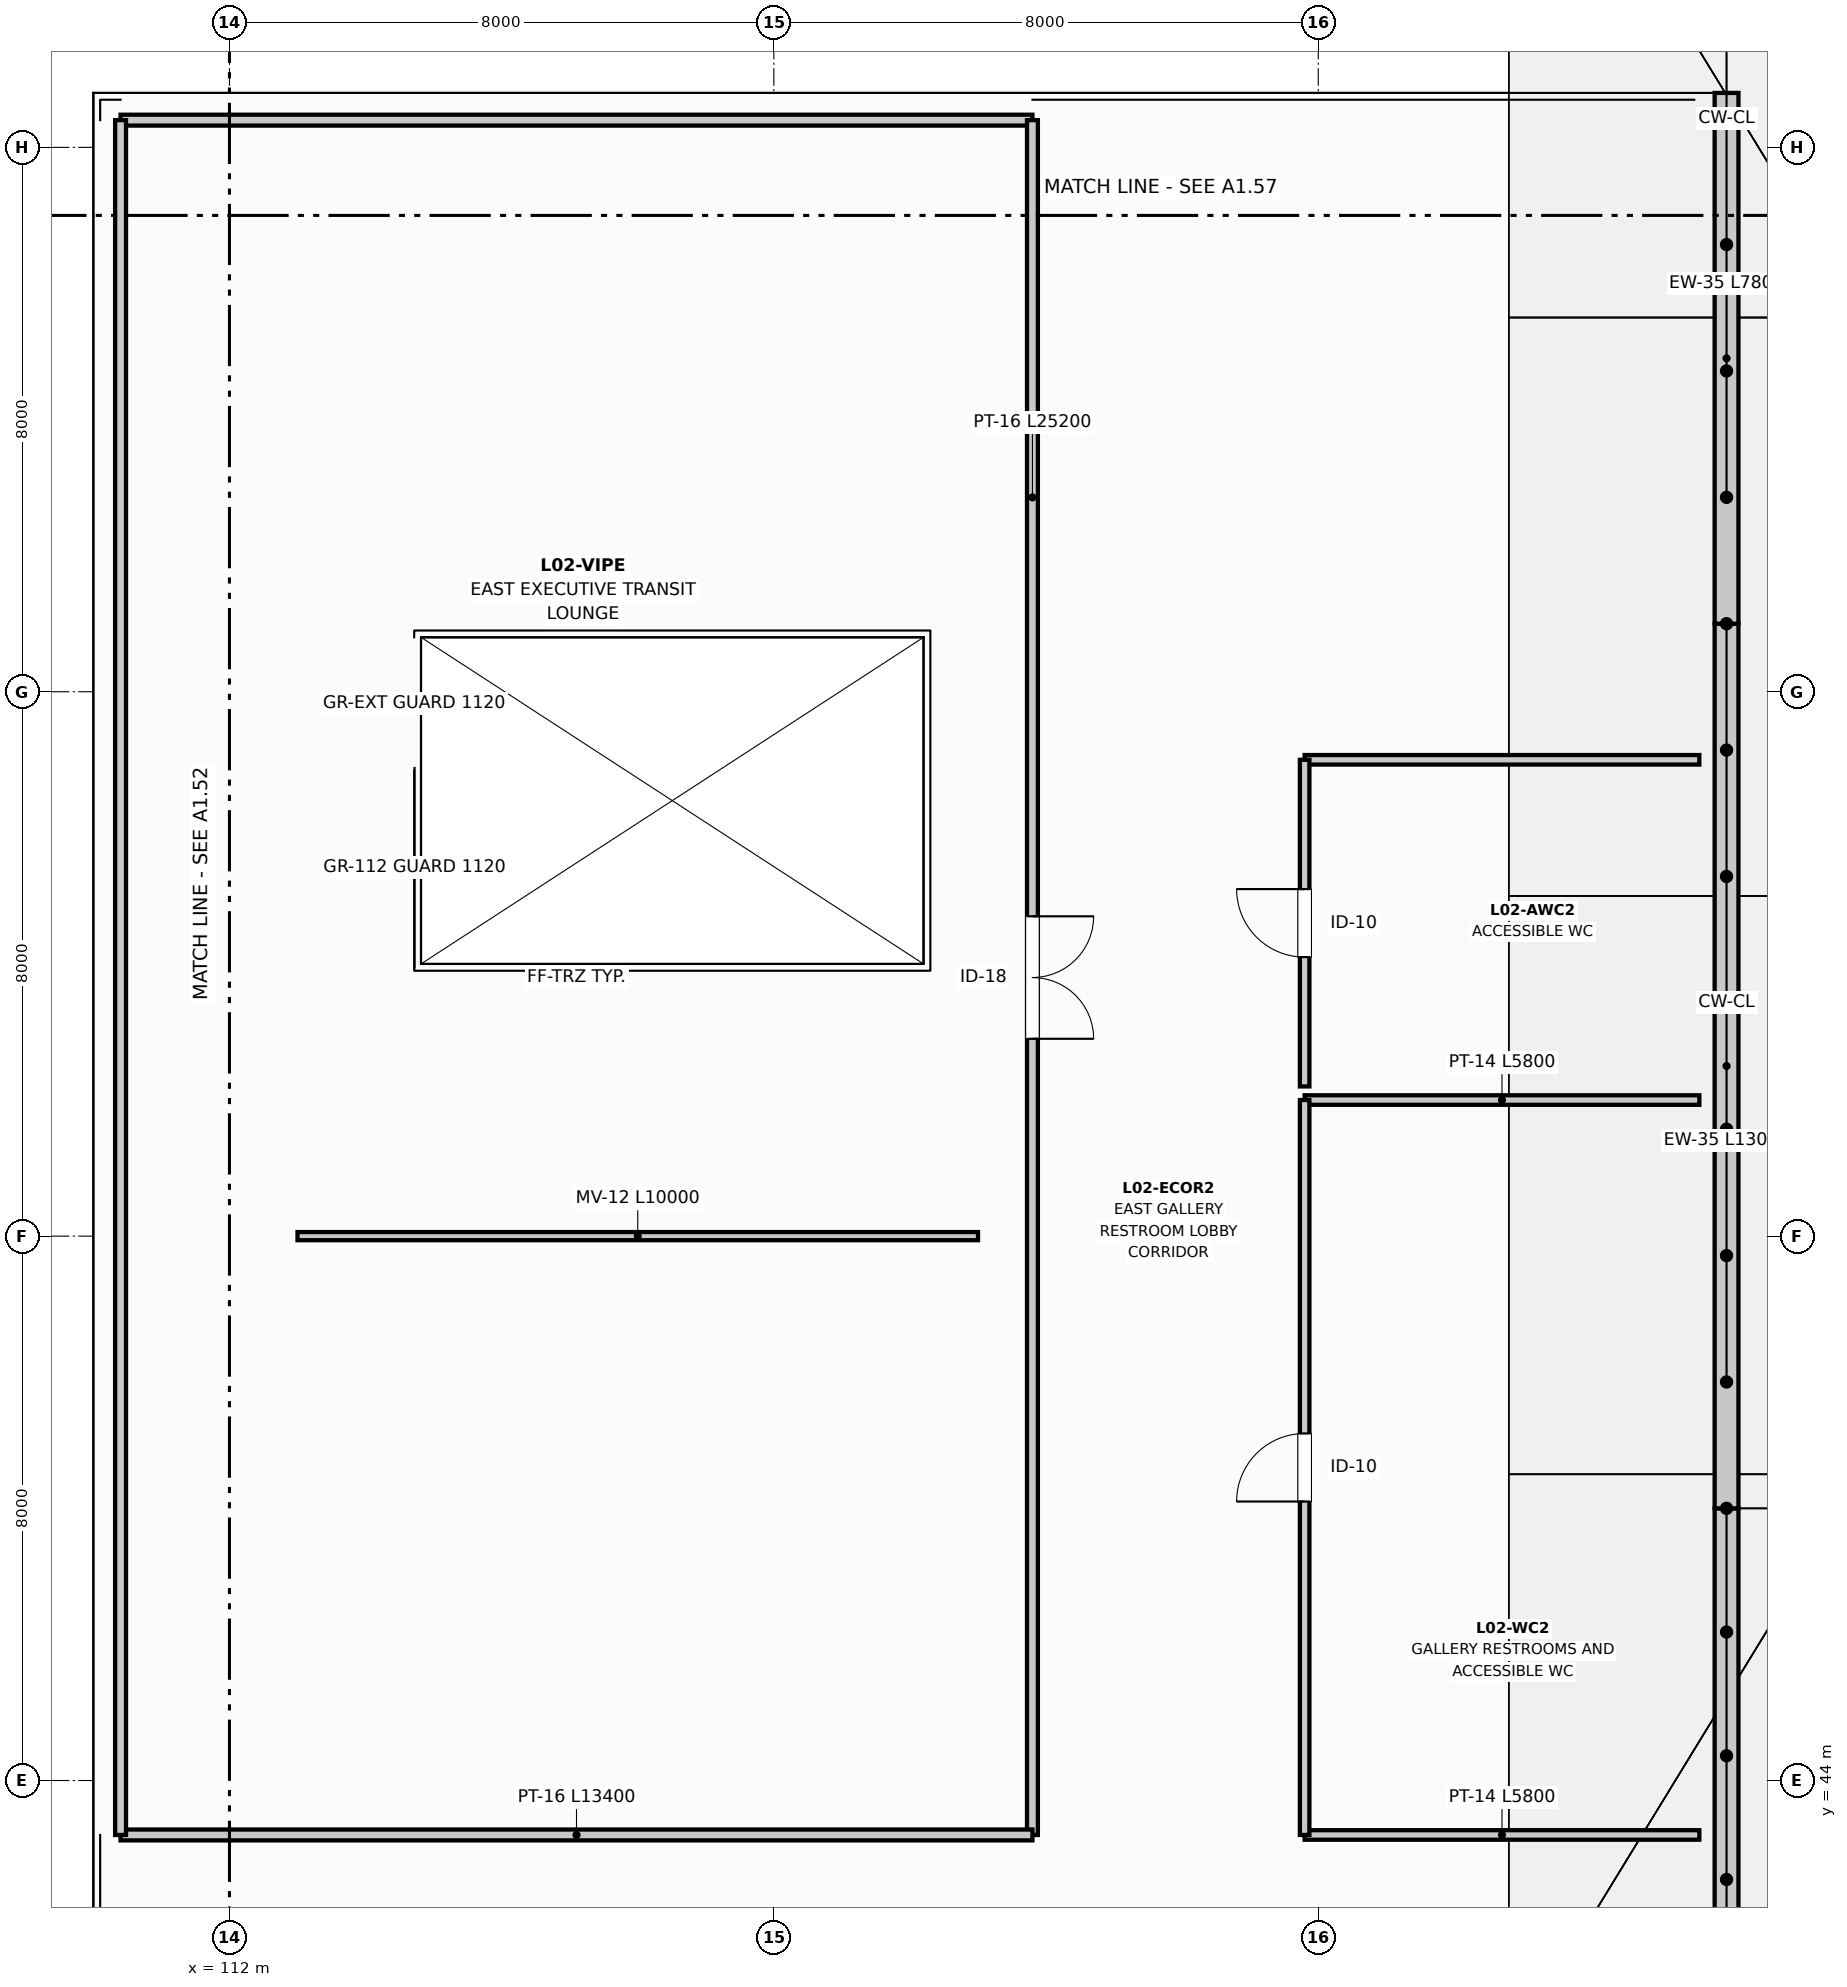
"""IFC4 building model, lengths in metres.
Left out: names, types, materials, properties, quantities, classifications, styles, units other than length and angle.
Written with IfcOpenShell. Run it as: python <this file> out.ifc"""

import sys

from ifc_helpers import new_model, si_unit, direction, frame, frame_2d, origin, place, context, subcontext, project, spatial, rectangle, extrude, element, fill, save


model = new_model("IFC4")
c1 = context("Model", 3, precision=1e-05, world=origin(), true_north=direction((0.0, 1.0)))
c2 = subcontext(c1, "Body", "Model", "MODEL_VIEW")
j1 = project(units=[si_unit("LENGTHUNIT", "METRE"), si_unit("PLANEANGLEUNIT", "RADIAN")], contexts=[c1])
p1 = place(None, origin())
s1 = spatial("IfcSite", under=j1, at=p1, CompositionType="ELEMENT")
p2 = place(p1, origin())
s2 = spatial("IfcBuilding", under=s1, at=p2, CompositionType="ELEMENT")
p3 = place(p2, frame((0.0, 0.0, 11.4)))
s3 = spatial("IfcBuildingStorey", under=s2, at=p3, CompositionType="ELEMENT", Elevation=11.4)
p4 = place(p3, frame((134.0, 28.0, 0.0), z_axis=(0.0, 0.0, 1.0), x_axis=(0.0, 1.0, 0.0)))
e1 = element("IfcWall", 1, at=p4, inside=s3, PredefinedType="STANDARD", context=c2, shape_type="SweptSolid", body=[
    extrude(rectangle(XDim=20.0, YDim=0.35, at=frame_2d((10.0, 0.0))), origin(), (0.0, 0.0, 1.0), 1.162),
])
p5 = place(p3, frame((134.0, 48.0, 0.0), z_axis=(0.0, 0.0, 1.0), x_axis=(0.0, 1.0, 0.0)))
e2 = element("IfcWall", 2, at=p5, inside=s3, PredefinedType="STANDARD", context=c2, shape_type="SweptSolid", body=[
    extrude(rectangle(XDim=13.0, YDim=0.35, at=frame_2d((6.5, 0.0))), origin(), (0.0, 0.0, 1.0), 0.95),
])
p6 = place(p3, frame((134.0, 61.0, 0.0), z_axis=(0.0, 0.0, 1.0), x_axis=(0.0, 1.0, 0.0)))
e3 = element("IfcWall", 3, at=p6, inside=s3, PredefinedType="STANDARD", context=c2, shape_type="SweptSolid", body=[
    extrude(rectangle(XDim=7.8, YDim=0.35, at=frame_2d((3.9, 0.0))), origin(), (0.0, 0.0, 1.0), 0.95),
])
p7 = place(p3, frame((110.4, 68.4, 0.0), z_axis=(0.0, 0.0, 1.0), x_axis=(1.0, 0.0, 0.0)))
e4 = element("IfcWall", 4, at=p7, inside=s3, PredefinedType="PARTITIONING", context=c2, shape_type="SweptSolid", body=[
    extrude(rectangle(XDim=13.4, YDim=0.16, at=frame_2d((6.7, 0.0))), origin(), (0.0, 0.0, 1.0), 4.46),
])
p8 = place(p3, frame((123.8, 68.4, 0.0), z_axis=(0.0, 0.0, 1.0), x_axis=(0.0, -1.0, 0.0)))
e5 = element("IfcWall", 5, at=p8, inside=s3, PredefinedType="PARTITIONING", context=c2, shape_type="SweptSolid", body=[
    extrude(rectangle(XDim=25.2, YDim=0.16, at=frame_2d((12.6, 0.0))), origin(), (0.0, 0.0, 1.0), 4.46),
])
p9 = place(p8, frame((11.7, 0.0, 0.0)))
e6 = element("IfcOpeningElement", 6, at=p9, cuts=e5, PredefinedType="OPENING", context=c2, shape_type="SweptSolid", body=[
    extrude(rectangle(XDim=1.8, YDim=2.25, at=frame_2d((0.9, 1.125))), frame((0.0, 0.09, 0.0), z_axis=(0.0, -1.0, 0.0), x_axis=(1.0, 0.0, 0.0)), (0.0, 0.0, 1.0), 0.18),
])
p10 = place(p3, frame((123.8, 43.2, 0.0), z_axis=(0.0, 0.0, 1.0), x_axis=(-1.0, 0.0, 0.0)))
e7 = element("IfcWall", 7, at=p10, inside=s3, PredefinedType="PARTITIONING", context=c2, shape_type="SweptSolid", body=[
    extrude(rectangle(XDim=13.4, YDim=0.16, at=frame_2d((6.7, 0.0))), origin(), (0.0, 0.0, 1.0), 4.46),
])
p11 = place(p3, frame((110.4, 43.2, 0.0), z_axis=(0.0, 0.0, 1.0), x_axis=(0.0, 1.0, 0.0)))
e8 = element("IfcWall", 8, at=p11, inside=s3, PredefinedType="PARTITIONING", context=c2, shape_type="SweptSolid", body=[
    extrude(rectangle(XDim=25.2, YDim=0.16, at=frame_2d((12.6, 0.0))), origin(), (0.0, 0.0, 1.0), 4.46),
])
for number, where, z_axis, x_axis in (
    (9, (127.8, 54.0, 0.0), (0.0, 0.0, 1.0), (1.0, 0.0, 0.0)),
    (10, (133.6, 43.2, 0.0), (0.0, 0.0, 1.0), (-1.0, 0.0, 0.0)),
):
    element("IfcWall", number, at=place(p3, frame(where, z_axis=z_axis, x_axis=x_axis)), inside=s3, PredefinedType="PARTITIONING", context=c2, shape_type="SweptSolid", body=[
        extrude(rectangle(XDim=5.8, YDim=0.14, at=frame_2d((2.9, 0.0))), origin(), (0.0, 0.0, 1.0), 4.46),
    ])
p12 = place(p3, frame((127.8, 43.2, 0.0), z_axis=(0.0, 0.0, 1.0), x_axis=(0.0, 1.0, 0.0)))
e11 = element("IfcWall", 11, at=p12, inside=s3, PredefinedType="PARTITIONING", context=c2, shape_type="SweptSolid", body=[
    extrude(rectangle(XDim=10.8, YDim=0.14, at=frame_2d((5.4, 0.0))), origin(), (0.0, 0.0, 1.0), 4.46),
])
p13 = place(p12, frame((4.9, 0.0, 0.0)))
e12 = element("IfcOpeningElement", 12, at=p13, cuts=e11, PredefinedType="OPENING", context=c2, shape_type="SweptSolid", body=[
    extrude(rectangle(XDim=1.0, YDim=2.15, at=frame_2d((0.5, 1.075))), frame((0.0, 0.08, 0.0), z_axis=(0.0, -1.0, 0.0), x_axis=(1.0, 0.0, 0.0)), (0.0, 0.0, 1.0), 0.16),
])
p14 = place(p3, frame((127.8, 59.0, 0.0), z_axis=(0.0, 0.0, 1.0), x_axis=(1.0, 0.0, 0.0)))
e13 = element("IfcWall", 13, at=p14, inside=s3, PredefinedType="PARTITIONING", context=c2, shape_type="SweptSolid", body=[
    extrude(rectangle(XDim=5.8, YDim=0.14, at=frame_2d((2.9, 0.0))), origin(), (0.0, 0.0, 1.0), 4.46),
])
p15 = place(p3, frame((127.8, 54.2, 0.0), z_axis=(0.0, 0.0, 1.0), x_axis=(0.0, 1.0, 0.0)))
e14 = element("IfcWall", 14, at=p15, inside=s3, PredefinedType="PARTITIONING", context=c2, shape_type="SweptSolid", body=[
    extrude(rectangle(XDim=4.8, YDim=0.14, at=frame_2d((2.4, 0.0))), origin(), (0.0, 0.0, 1.0), 4.46),
])
p16 = place(p15, frame((1.9, 0.0, 0.0)))
e15 = element("IfcOpeningElement", 15, at=p16, cuts=e14, PredefinedType="OPENING", context=c2, shape_type="SweptSolid", body=[
    extrude(rectangle(XDim=1.0, YDim=2.15, at=frame_2d((0.5, 1.075))), frame((0.0, 0.08, 0.0), z_axis=(0.0, -1.0, 0.0), x_axis=(1.0, 0.0, 0.0)), (0.0, 0.0, 1.0), 0.16),
])
p17 = place(p3, frame((113.0, 52.0, 0.0), z_axis=(0.0, 0.0, 1.0), x_axis=(1.0, 0.0, 0.0)))
e16 = element("IfcWall", 16, at=p17, inside=s3, PredefinedType="MOVABLE", context=c2, shape_type="SweptSolid", body=[
    extrude(rectangle(XDim=10.0, YDim=0.12, at=frame_2d((5.0, 0.0))), origin(), (0.0, 0.0, 1.0), 3.4),
])
p18 = place(p9, origin())
e17 = element("IfcDoor", 17, at=p18, inside=s3, OperationType="DOUBLE_DOOR_SINGLE_SWING", PredefinedType="DOOR", context=c2, shape_type="SweptSolid", body=[
    extrude(rectangle(XDim=1.8, YDim=2.25, at=frame_2d((0.9, 1.125))), frame((0.0, 0.025, 0.0), z_axis=(0.0, -1.0, 0.0), x_axis=(1.0, 0.0, 0.0)), (0.0, 0.0, 1.0), 0.05),
])
fill(e6, e17)
p19 = place(p13, origin())
e18 = element("IfcDoor", 18, at=p19, inside=s3, OperationType="SINGLE_SWING_LEFT", PredefinedType="DOOR", context=c2, shape_type="SweptSolid", body=[
    extrude(rectangle(XDim=1.0, YDim=2.15, at=frame_2d((0.5, 1.075))), frame((0.0, 0.025, 0.0), z_axis=(0.0, -1.0, 0.0), x_axis=(1.0, 0.0, 0.0)), (0.0, 0.0, 1.0), 0.05),
])
fill(e12, e18)
p20 = place(p16, origin())
e19 = element("IfcDoor", 19, at=p20, inside=s3, OperationType="SINGLE_SWING_RIGHT", PredefinedType="DOOR", context=c2, shape_type="SweptSolid", body=[
    extrude(rectangle(XDim=1.0, YDim=2.15, at=frame_2d((0.5, 1.075))), frame((0.0, 0.025, 0.0), z_axis=(0.0, -1.0, 0.0), x_axis=(1.0, 0.0, 0.0)), (0.0, 0.0, 1.0), 0.05),
])
fill(e15, e19)
save(model, sys.argv[1])
